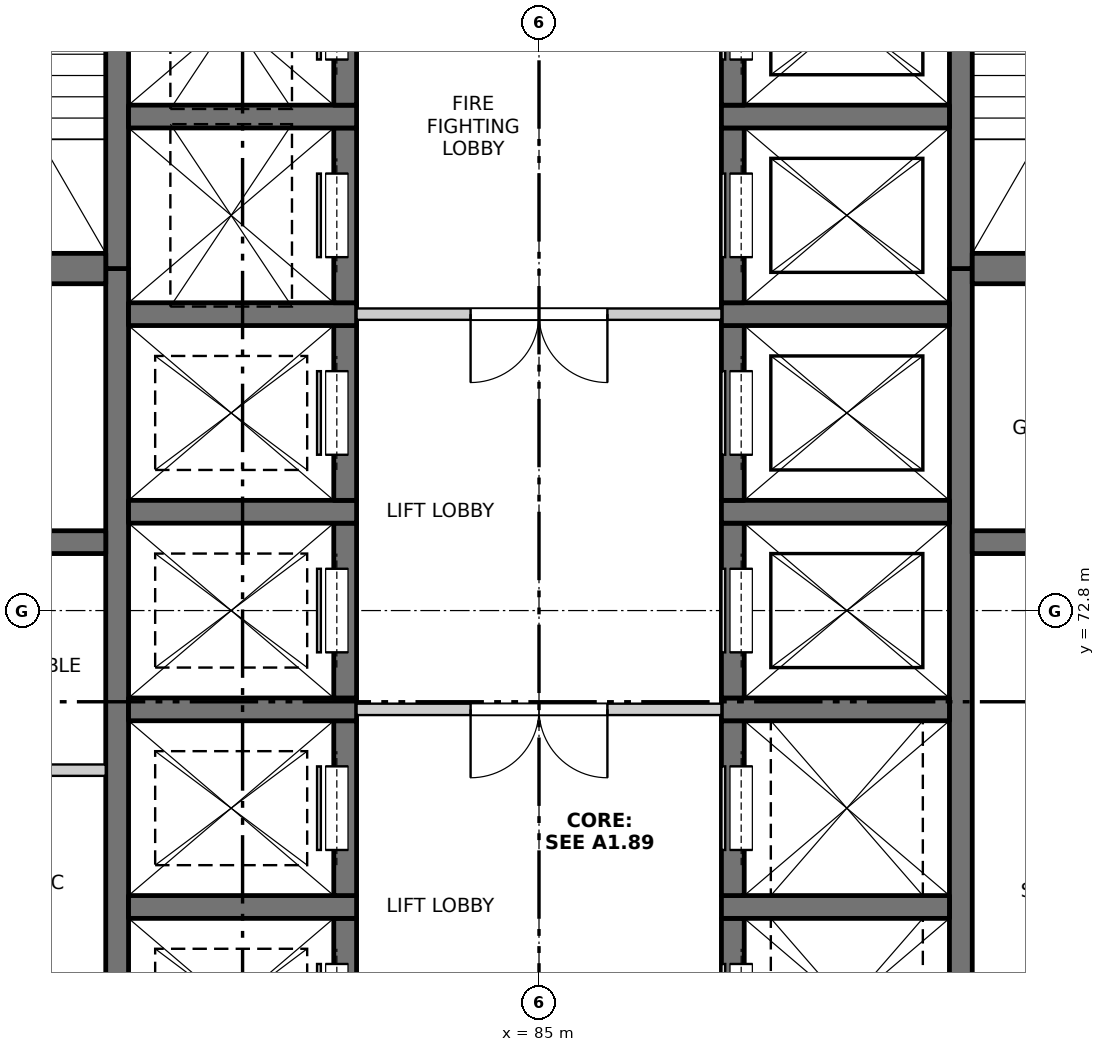
"""IFC4 building model, lengths in metres.
Left out: names, types, materials, properties, quantities, classifications, styles, units other than length and angle.
Written with IfcOpenShell. Run it as: python <this file> out.ifc"""

import sys

from ifc_helpers import new_model, si_unit, direction, frame, frame_2d, origin, place, context, subcontext, project, spatial, rectangle, extrude, element, fill, save


model = new_model("IFC4")
c1 = context("Model", 3, precision=1e-05, world=origin(), true_north=direction((0.0, 1.0)))
c2 = subcontext(c1, "Body", "Model", "MODEL_VIEW")
j1 = project(units=[si_unit("LENGTHUNIT", "METRE"), si_unit("PLANEANGLEUNIT", "RADIAN")], contexts=[c1])
p1 = place(None, origin())
s1 = spatial("IfcSite", under=j1, at=p1, CompositionType="ELEMENT")
p2 = place(p1, origin())
s2 = spatial("IfcBuilding", under=s1, at=p2, CompositionType="ELEMENT")
p3 = place(p2, frame((0.0, 0.0, 133.9)))
s3 = spatial("IfcBuildingStorey", under=s2, at=p3, CompositionType="ELEMENT", Elevation=133.9)
p4 = place(p3, frame((79.45, 60.95, -0.25), z_axis=(0.0, 0.0, 1.0), x_axis=(0.0, 1.0, 0.0)))
e1 = element("IfcWall", 1, at=p4, inside=s3, PredefinedType="SOLIDWALL", context=c2, shape_type="SweptSolid", body=[
    extrude(rectangle(XDim=16.35, YDim=0.3, at=frame_2d((8.175, 0.0))), origin(), (0.0, 0.0, 1.0), 3.4),
])
p5 = place(p3, frame((79.45, 77.3, -0.25), z_axis=(0.0, 0.0, 1.0), x_axis=(0.0, 1.0, 0.0)))
e2 = element("IfcWall", 2, at=p5, inside=s3, PredefinedType="SOLIDWALL", context=c2, shape_type="SweptSolid", body=[
    extrude(rectangle(XDim=6.925, YDim=0.3, at=frame_2d((3.462, 0.0))), origin(), (0.0, 0.0, 1.0), 3.4),
])
p6 = place(p3, frame((90.55, 61.95, -0.25), z_axis=(0.0, 0.0, 1.0), x_axis=(0.0, 1.0, 0.0)))
e3 = element("IfcWall", 3, at=p6, inside=s3, PredefinedType="SOLIDWALL", context=c2, shape_type="SweptSolid", body=[
    extrude(rectangle(XDim=15.35, YDim=0.3, at=frame_2d((7.675, 0.0))), origin(), (0.0, 0.0, 1.0), 3.4),
])
p7 = place(p3, frame((90.55, 77.3, -0.25), z_axis=(0.0, 0.0, 1.0), x_axis=(0.0, 1.0, 0.0)))
e4 = element("IfcWall", 4, at=p7, inside=s3, PredefinedType="SOLIDWALL", context=c2, shape_type="SweptSolid", body=[
    extrude(rectangle(XDim=6.925, YDim=0.3, at=frame_2d((3.462, 0.0))), origin(), (0.0, 0.0, 1.0), 3.4),
])
p8 = place(p3, frame((82.45, 66.45, -0.25), z_axis=(0.0, 0.0, 1.0), x_axis=(0.0, 1.0, 0.0)))
e5 = element("IfcWall", 5, at=p8, inside=s3, PredefinedType="SOLIDWALL", context=c2, shape_type="SweptSolid", body=[
    extrude(rectangle(XDim=2.3, YDim=0.3, at=frame_2d((1.15, 0.0))), origin(), (0.0, 0.0, 1.0), 3.4),
])
p9 = place(p8, frame((0.6, 0.0, 0.25)))
e6 = element("IfcOpeningElement", 6, at=p9, cuts=e5, PredefinedType="OPENING", context=c2, shape_type="SweptSolid", body=[
    extrude(rectangle(XDim=1.1, YDim=2.1, at=frame_2d((0.55, 1.05))), frame((0.0, 0.16, 0.0), z_axis=(0.0, -1.0, 0.0), x_axis=(1.0, 0.0, 0.0)), (0.0, 0.0, 1.0), 0.32),
])
p10 = place(p3, frame((79.6, 68.9, -0.25), z_axis=(0.0, 0.0, 1.0), x_axis=(1.0, 0.0, 0.0)))
e7 = element("IfcWall", 7, at=p10, inside=s3, PredefinedType="SOLIDWALL", context=c2, shape_type="SweptSolid", body=[
    extrude(rectangle(XDim=3.0, YDim=0.3, at=frame_2d((1.5, 0.0))), origin(), (0.0, 0.0, 1.0), 3.4),
])
p11 = place(p3, frame((82.45, 69.05, -0.25), z_axis=(0.0, 0.0, 1.0), x_axis=(0.0, 1.0, 0.0)))
e8 = element("IfcWall", 8, at=p11, inside=s3, PredefinedType="SOLIDWALL", context=c2, shape_type="SweptSolid", body=[
    extrude(rectangle(XDim=2.3, YDim=0.3, at=frame_2d((1.15, 0.0))), origin(), (0.0, 0.0, 1.0), 3.4),
])
p12 = place(p11, frame((0.6, 0.0, 0.25)))
e9 = element("IfcOpeningElement", 9, at=p12, cuts=e8, PredefinedType="OPENING", context=c2, shape_type="SweptSolid", body=[
    extrude(rectangle(XDim=1.1, YDim=2.1, at=frame_2d((0.55, 1.05))), frame((0.0, 0.16, 0.0), z_axis=(0.0, -1.0, 0.0), x_axis=(1.0, 0.0, 0.0)), (0.0, 0.0, 1.0), 0.32),
])
p13 = place(p3, frame((79.6, 71.5, -0.25), z_axis=(0.0, 0.0, 1.0), x_axis=(1.0, 0.0, 0.0)))
e10 = element("IfcWall", 10, at=p13, inside=s3, PredefinedType="SOLIDWALL", context=c2, shape_type="SweptSolid", body=[
    extrude(rectangle(XDim=3.0, YDim=0.3, at=frame_2d((1.5, 0.0))), origin(), (0.0, 0.0, 1.0), 3.4),
])
p14 = place(p3, frame((82.45, 71.65, -0.25), z_axis=(0.0, 0.0, 1.0), x_axis=(0.0, 1.0, 0.0)))
e11 = element("IfcWall", 11, at=p14, inside=s3, PredefinedType="SOLIDWALL", context=c2, shape_type="SweptSolid", body=[
    extrude(rectangle(XDim=2.3, YDim=0.3, at=frame_2d((1.15, 0.0))), origin(), (0.0, 0.0, 1.0), 3.4),
])
p15 = place(p14, frame((0.6, 0.0, 0.25)))
e12 = element("IfcOpeningElement", 12, at=p15, cuts=e11, PredefinedType="OPENING", context=c2, shape_type="SweptSolid", body=[
    extrude(rectangle(XDim=1.1, YDim=2.1, at=frame_2d((0.55, 1.05))), frame((0.0, 0.16, 0.0), z_axis=(0.0, -1.0, 0.0), x_axis=(1.0, 0.0, 0.0)), (0.0, 0.0, 1.0), 0.32),
])
p16 = place(p3, frame((79.6, 74.1, -0.25), z_axis=(0.0, 0.0, 1.0), x_axis=(1.0, 0.0, 0.0)))
e13 = element("IfcWall", 13, at=p16, inside=s3, PredefinedType="SOLIDWALL", context=c2, shape_type="SweptSolid", body=[
    extrude(rectangle(XDim=3.0, YDim=0.3, at=frame_2d((1.5, 0.0))), origin(), (0.0, 0.0, 1.0), 3.4),
])
p17 = place(p3, frame((82.45, 74.25, -0.25), z_axis=(0.0, 0.0, 1.0), x_axis=(0.0, 1.0, 0.0)))
e14 = element("IfcWall", 14, at=p17, inside=s3, PredefinedType="SOLIDWALL", context=c2, shape_type="SweptSolid", body=[
    extrude(rectangle(XDim=2.3, YDim=0.3, at=frame_2d((1.15, 0.0))), origin(), (0.0, 0.0, 1.0), 3.4),
])
p18 = place(p17, frame((0.6, 0.0, 0.25)))
e15 = element("IfcOpeningElement", 15, at=p18, cuts=e14, PredefinedType="OPENING", context=c2, shape_type="SweptSolid", body=[
    extrude(rectangle(XDim=1.1, YDim=2.1, at=frame_2d((0.55, 1.05))), frame((0.0, 0.16, 0.0), z_axis=(0.0, -1.0, 0.0), x_axis=(1.0, 0.0, 0.0)), (0.0, 0.0, 1.0), 0.32),
])
p19 = place(p3, frame((79.6, 76.7, -0.25), z_axis=(0.0, 0.0, 1.0), x_axis=(1.0, 0.0, 0.0)))
e16 = element("IfcWall", 16, at=p19, inside=s3, PredefinedType="SOLIDWALL", context=c2, shape_type="SweptSolid", body=[
    extrude(rectangle(XDim=3.0, YDim=0.3, at=frame_2d((1.5, 0.0))), origin(), (0.0, 0.0, 1.0), 3.4),
])
p20 = place(p3, frame((82.45, 76.85, -0.25), z_axis=(0.0, 0.0, 1.0), x_axis=(0.0, 1.0, 0.0)))
e17 = element("IfcWall", 17, at=p20, inside=s3, PredefinedType="SOLIDWALL", context=c2, shape_type="SweptSolid", body=[
    extrude(rectangle(XDim=2.3, YDim=0.3, at=frame_2d((1.15, 0.0))), origin(), (0.0, 0.0, 1.0), 3.4),
])
p21 = place(p20, frame((0.6, 0.0, 0.25)))
e18 = element("IfcOpeningElement", 18, at=p21, cuts=e17, PredefinedType="OPENING", context=c2, shape_type="SweptSolid", body=[
    extrude(rectangle(XDim=1.1, YDim=2.1, at=frame_2d((0.55, 1.05))), frame((0.0, 0.16, 0.0), z_axis=(0.0, -1.0, 0.0), x_axis=(1.0, 0.0, 0.0)), (0.0, 0.0, 1.0), 0.32),
])
p22 = place(p3, frame((79.6, 79.3, -0.25), z_axis=(0.0, 0.0, 1.0), x_axis=(1.0, 0.0, 0.0)))
e19 = element("IfcWall", 19, at=p22, inside=s3, PredefinedType="SOLIDWALL", context=c2, shape_type="SweptSolid", body=[
    extrude(rectangle(XDim=3.0, YDim=0.3, at=frame_2d((1.5, 0.0))), origin(), (0.0, 0.0, 1.0), 3.4),
])
p23 = place(p3, frame((82.45, 79.45, -0.25), z_axis=(0.0, 0.0, 1.0), x_axis=(0.0, 1.0, 0.0)))
e20 = element("IfcWall", 20, at=p23, inside=s3, PredefinedType="SOLIDWALL", context=c2, shape_type="SweptSolid", body=[
    extrude(rectangle(XDim=2.3, YDim=0.3, at=frame_2d((1.15, 0.0))), origin(), (0.0, 0.0, 1.0), 3.4),
])
p24 = place(p23, frame((0.6, 0.0, 0.25)))
e21 = element("IfcOpeningElement", 21, at=p24, cuts=e20, PredefinedType="OPENING", context=c2, shape_type="SweptSolid", body=[
    extrude(rectangle(XDim=1.1, YDim=2.1, at=frame_2d((0.55, 1.05))), frame((0.0, 0.16, 0.0), z_axis=(0.0, -1.0, 0.0), x_axis=(1.0, 0.0, 0.0)), (0.0, 0.0, 1.0), 0.32),
])
p25 = place(p3, frame((87.55, 66.45, -0.25), z_axis=(0.0, 0.0, 1.0), x_axis=(0.0, 1.0, 0.0)))
e22 = element("IfcWall", 22, at=p25, inside=s3, PredefinedType="SOLIDWALL", context=c2, shape_type="SweptSolid", body=[
    extrude(rectangle(XDim=2.3, YDim=0.3, at=frame_2d((1.15, 0.0))), origin(), (0.0, 0.0, 1.0), 3.4),
])
p26 = place(p25, frame((0.6, 0.0, 0.25)))
e23 = element("IfcOpeningElement", 23, at=p26, cuts=e22, PredefinedType="OPENING", context=c2, shape_type="SweptSolid", body=[
    extrude(rectangle(XDim=1.1, YDim=2.1, at=frame_2d((0.55, 1.05))), frame((0.0, 0.16, 0.0), z_axis=(0.0, -1.0, 0.0), x_axis=(1.0, 0.0, 0.0)), (0.0, 0.0, 1.0), 0.32),
])
p27 = place(p3, frame((87.4, 68.9, -0.25), z_axis=(0.0, 0.0, 1.0), x_axis=(1.0, 0.0, 0.0)))
e24 = element("IfcWall", 24, at=p27, inside=s3, PredefinedType="SOLIDWALL", context=c2, shape_type="SweptSolid", body=[
    extrude(rectangle(XDim=3.0, YDim=0.3, at=frame_2d((1.5, 0.0))), origin(), (0.0, 0.0, 1.0), 3.4),
])
p28 = place(p3, frame((87.55, 69.05, -0.25), z_axis=(0.0, 0.0, 1.0), x_axis=(0.0, 1.0, 0.0)))
e25 = element("IfcWall", 25, at=p28, inside=s3, PredefinedType="SOLIDWALL", context=c2, shape_type="SweptSolid", body=[
    extrude(rectangle(XDim=2.3, YDim=0.3, at=frame_2d((1.15, 0.0))), origin(), (0.0, 0.0, 1.0), 3.4),
])
p29 = place(p28, frame((0.6, 0.0, 0.25)))
e26 = element("IfcOpeningElement", 26, at=p29, cuts=e25, PredefinedType="OPENING", context=c2, shape_type="SweptSolid", body=[
    extrude(rectangle(XDim=1.1, YDim=2.1, at=frame_2d((0.55, 1.05))), frame((0.0, 0.16, 0.0), z_axis=(0.0, -1.0, 0.0), x_axis=(1.0, 0.0, 0.0)), (0.0, 0.0, 1.0), 0.32),
])
p30 = place(p3, frame((87.4, 71.5, -0.25), z_axis=(0.0, 0.0, 1.0), x_axis=(1.0, 0.0, 0.0)))
e27 = element("IfcWall", 27, at=p30, inside=s3, PredefinedType="SOLIDWALL", context=c2, shape_type="SweptSolid", body=[
    extrude(rectangle(XDim=3.0, YDim=0.3, at=frame_2d((1.5, 0.0))), origin(), (0.0, 0.0, 1.0), 3.4),
])
p31 = place(p3, frame((87.55, 71.65, -0.25), z_axis=(0.0, 0.0, 1.0), x_axis=(0.0, 1.0, 0.0)))
e28 = element("IfcWall", 28, at=p31, inside=s3, PredefinedType="SOLIDWALL", context=c2, shape_type="SweptSolid", body=[
    extrude(rectangle(XDim=2.3, YDim=0.3, at=frame_2d((1.15, 0.0))), origin(), (0.0, 0.0, 1.0), 3.4),
])
p32 = place(p31, frame((0.6, 0.0, 0.25)))
e29 = element("IfcOpeningElement", 29, at=p32, cuts=e28, PredefinedType="OPENING", context=c2, shape_type="SweptSolid", body=[
    extrude(rectangle(XDim=1.1, YDim=2.1, at=frame_2d((0.55, 1.05))), frame((0.0, 0.16, 0.0), z_axis=(0.0, -1.0, 0.0), x_axis=(1.0, 0.0, 0.0)), (0.0, 0.0, 1.0), 0.32),
])
p33 = place(p3, frame((87.4, 74.1, -0.25), z_axis=(0.0, 0.0, 1.0), x_axis=(1.0, 0.0, 0.0)))
e30 = element("IfcWall", 30, at=p33, inside=s3, PredefinedType="SOLIDWALL", context=c2, shape_type="SweptSolid", body=[
    extrude(rectangle(XDim=3.0, YDim=0.3, at=frame_2d((1.5, 0.0))), origin(), (0.0, 0.0, 1.0), 3.4),
])
p34 = place(p3, frame((87.55, 74.25, -0.25), z_axis=(0.0, 0.0, 1.0), x_axis=(0.0, 1.0, 0.0)))
e31 = element("IfcWall", 31, at=p34, inside=s3, PredefinedType="SOLIDWALL", context=c2, shape_type="SweptSolid", body=[
    extrude(rectangle(XDim=2.3, YDim=0.3, at=frame_2d((1.15, 0.0))), origin(), (0.0, 0.0, 1.0), 3.4),
])
p35 = place(p34, frame((0.6, 0.0, 0.25)))
e32 = element("IfcOpeningElement", 32, at=p35, cuts=e31, PredefinedType="OPENING", context=c2, shape_type="SweptSolid", body=[
    extrude(rectangle(XDim=1.1, YDim=2.1, at=frame_2d((0.55, 1.05))), frame((0.0, 0.16, 0.0), z_axis=(0.0, -1.0, 0.0), x_axis=(1.0, 0.0, 0.0)), (0.0, 0.0, 1.0), 0.32),
])
p36 = place(p3, frame((87.4, 76.7, -0.25), z_axis=(0.0, 0.0, 1.0), x_axis=(1.0, 0.0, 0.0)))
e33 = element("IfcWall", 33, at=p36, inside=s3, PredefinedType="SOLIDWALL", context=c2, shape_type="SweptSolid", body=[
    extrude(rectangle(XDim=3.0, YDim=0.3, at=frame_2d((1.5, 0.0))), origin(), (0.0, 0.0, 1.0), 3.4),
])
p37 = place(p3, frame((87.55, 76.85, -0.25), z_axis=(0.0, 0.0, 1.0), x_axis=(0.0, 1.0, 0.0)))
e34 = element("IfcWall", 34, at=p37, inside=s3, PredefinedType="SOLIDWALL", context=c2, shape_type="SweptSolid", body=[
    extrude(rectangle(XDim=2.3, YDim=0.3, at=frame_2d((1.15, 0.0))), origin(), (0.0, 0.0, 1.0), 3.4),
])
p38 = place(p37, frame((0.6, 0.0, 0.25)))
e35 = element("IfcOpeningElement", 35, at=p38, cuts=e34, PredefinedType="OPENING", context=c2, shape_type="SweptSolid", body=[
    extrude(rectangle(XDim=1.1, YDim=2.1, at=frame_2d((0.55, 1.05))), frame((0.0, 0.16, 0.0), z_axis=(0.0, -1.0, 0.0), x_axis=(1.0, 0.0, 0.0)), (0.0, 0.0, 1.0), 0.32),
])
p39 = place(p3, frame((87.4, 79.3, -0.25), z_axis=(0.0, 0.0, 1.0), x_axis=(1.0, 0.0, 0.0)))
e36 = element("IfcWall", 36, at=p39, inside=s3, PredefinedType="SOLIDWALL", context=c2, shape_type="SweptSolid", body=[
    extrude(rectangle(XDim=3.0, YDim=0.3, at=frame_2d((1.5, 0.0))), origin(), (0.0, 0.0, 1.0), 3.4),
])
p40 = place(p3, frame((87.55, 79.45, -0.25), z_axis=(0.0, 0.0, 1.0), x_axis=(0.0, 1.0, 0.0)))
e37 = element("IfcWall", 37, at=p40, inside=s3, PredefinedType="SOLIDWALL", context=c2, shape_type="SweptSolid", body=[
    extrude(rectangle(XDim=2.3, YDim=0.3, at=frame_2d((1.15, 0.0))), origin(), (0.0, 0.0, 1.0), 3.4),
])
p41 = place(p40, frame((0.6, 0.0, 0.25)))
e38 = element("IfcOpeningElement", 38, at=p41, cuts=e37, PredefinedType="OPENING", context=c2, shape_type="SweptSolid", body=[
    extrude(rectangle(XDim=1.1, YDim=2.1, at=frame_2d((0.55, 1.05))), frame((0.0, 0.16, 0.0), z_axis=(0.0, -1.0, 0.0), x_axis=(1.0, 0.0, 0.0)), (0.0, 0.0, 1.0), 0.32),
])
p42 = place(p3, frame((75.525, 73.7, -0.25), z_axis=(0.0, 0.0, 1.0), x_axis=(1.0, 0.0, 0.0)))
e39 = element("IfcWall", 39, at=p42, inside=s3, PredefinedType="SOLIDWALL", context=c2, shape_type="SweptSolid", body=[
    extrude(rectangle(XDim=3.775, YDim=0.3, at=frame_2d((1.888, 0.0))), origin(), (0.0, 0.0, 1.0), 3.4),
])
p43 = place(p3, frame((75.525, 77.3, -0.25), z_axis=(0.0, 0.0, 1.0), x_axis=(1.0, 0.0, 0.0)))
e40 = element("IfcWall", 40, at=p43, inside=s3, PredefinedType="SOLIDWALL", context=c2, shape_type="SweptSolid", body=[
    extrude(rectangle(XDim=3.775, YDim=0.4, at=frame_2d((1.888, 0.0))), origin(), (0.0, 0.0, 1.0), 3.4),
])
p44 = place(p3, frame((90.7, 73.7, -0.25), z_axis=(0.0, 0.0, 1.0), x_axis=(1.0, 0.0, 0.0)))
e41 = element("IfcWall", 41, at=p44, inside=s3, PredefinedType="SOLIDWALL", context=c2, shape_type="SweptSolid", body=[
    extrude(rectangle(XDim=3.775, YDim=0.3, at=frame_2d((1.888, 0.0))), origin(), (0.0, 0.0, 1.0), 3.4),
])
p45 = place(p3, frame((90.7, 77.3, -0.25), z_axis=(0.0, 0.0, 1.0), x_axis=(1.0, 0.0, 0.0)))
e42 = element("IfcWall", 42, at=p45, inside=s3, PredefinedType="SOLIDWALL", context=c2, shape_type="SweptSolid", body=[
    extrude(rectangle(XDim=3.775, YDim=0.4, at=frame_2d((1.888, 0.0))), origin(), (0.0, 0.0, 1.0), 3.4),
])
p46 = place(p3, frame((75.525, 70.7, 0.0), z_axis=(0.0, 0.0, 1.0), x_axis=(1.0, 0.0, 0.0)))
e43 = element("IfcWall", 43, at=p46, inside=s3, PredefinedType="PARTITIONING", context=c2, shape_type="SweptSolid", body=[
    extrude(rectangle(XDim=3.775, YDim=0.15, at=frame_2d((1.887, 0.0))), origin(), (0.0, 0.0, 1.0), 3.15),
])
p47 = place(p3, frame((82.6, 71.5, 0.0), z_axis=(0.0, 0.0, 1.0), x_axis=(1.0, 0.0, 0.0)))
e44 = element("IfcWall", 44, at=p47, inside=s3, PredefinedType="PARTITIONING", context=c2, shape_type="SweptSolid", body=[
    extrude(rectangle(XDim=4.8, YDim=0.15, at=frame_2d((2.4, 0.0))), origin(), (0.0, 0.0, 1.0), 3.15),
])
p48 = place(p47, frame((1.5, 0.0, 0.0)))
e45 = element("IfcOpeningElement", 45, at=p48, cuts=e44, PredefinedType="OPENING", context=c2, shape_type="SweptSolid", body=[
    extrude(rectangle(XDim=1.8, YDim=2.1, at=frame_2d((0.9, 1.05))), frame((0.0, 0.085, 0.0), z_axis=(0.0, -1.0, 0.0), x_axis=(1.0, 0.0, 0.0)), (0.0, 0.0, 1.0), 0.17),
])
p49 = place(p3, frame((82.6, 76.7, 0.0), z_axis=(0.0, 0.0, 1.0), x_axis=(1.0, 0.0, 0.0)))
e46 = element("IfcWall", 46, at=p49, inside=s3, PredefinedType="PARTITIONING", context=c2, shape_type="SweptSolid", body=[
    extrude(rectangle(XDim=4.8, YDim=0.15, at=frame_2d((2.4, 0.0))), origin(), (0.0, 0.0, 1.0), 3.15),
])
p50 = place(p49, frame((1.5, 0.0, 0.0)))
e47 = element("IfcOpeningElement", 47, at=p50, cuts=e46, PredefinedType="OPENING", context=c2, shape_type="SweptSolid", body=[
    extrude(rectangle(XDim=1.8, YDim=2.1, at=frame_2d((0.9, 1.05))), frame((0.0, 0.085, 0.0), z_axis=(0.0, -1.0, 0.0), x_axis=(1.0, 0.0, 0.0)), (0.0, 0.0, 1.0), 0.17),
])
p51 = place(p9, origin())
e48 = element("IfcDoor", 48, at=p51, inside=s3, OperationType="SLIDING_TO_RIGHT", PredefinedType="DOOR", context=c2, shape_type="SweptSolid", body=[
    extrude(rectangle(XDim=1.1, YDim=2.1, at=frame_2d((0.55, 1.05))), frame((0.0, 0.135, 0.0), z_axis=(0.0, -1.0, 0.0), x_axis=(1.0, 0.0, 0.0)), (0.0, 0.0, 1.0), 0.05),
])
fill(e6, e48)
p52 = place(p26, origin())
e49 = element("IfcDoor", 49, at=p52, inside=s3, OperationType="SLIDING_TO_RIGHT", PredefinedType="DOOR", context=c2, shape_type="SweptSolid", body=[
    extrude(rectangle(XDim=1.1, YDim=2.1, at=frame_2d((0.55, 1.05))), frame((0.0, -0.085, 0.0), z_axis=(0.0, -1.0, 0.0), x_axis=(1.0, 0.0, 0.0)), (0.0, 0.0, 1.0), 0.05),
])
fill(e23, e49)
p53 = place(p12, origin())
e50 = element("IfcDoor", 50, at=p53, inside=s3, OperationType="SLIDING_TO_LEFT", PredefinedType="DOOR", context=c2, shape_type="SweptSolid", body=[
    extrude(rectangle(XDim=1.1, YDim=2.1, at=frame_2d((0.55, 1.05))), frame((0.0, 0.135, 0.0), z_axis=(0.0, -1.0, 0.0), x_axis=(1.0, 0.0, 0.0)), (0.0, 0.0, 1.0), 0.05),
])
fill(e9, e50)
p54 = place(p29, origin())
e51 = element("IfcDoor", 51, at=p54, inside=s3, OperationType="SLIDING_TO_LEFT", PredefinedType="DOOR", context=c2, shape_type="SweptSolid", body=[
    extrude(rectangle(XDim=1.1, YDim=2.1, at=frame_2d((0.55, 1.05))), frame((0.0, -0.085, 0.0), z_axis=(0.0, -1.0, 0.0), x_axis=(1.0, 0.0, 0.0)), (0.0, 0.0, 1.0), 0.05),
])
fill(e26, e51)
p55 = place(p48, origin())
e52 = element("IfcDoor", 52, at=p55, inside=s3, OperationType="DOUBLE_DOOR_SINGLE_SWING", PredefinedType="DOOR", context=c2, shape_type="SweptSolid", body=[
    extrude(rectangle(XDim=1.8, YDim=2.1, at=frame_2d((0.9, 1.05))), frame((0.0, 0.025, 0.0), z_axis=(0.0, -1.0, 0.0), x_axis=(1.0, 0.0, 0.0)), (0.0, 0.0, 1.0), 0.05),
])
fill(e45, e52)
p56 = place(p15, origin())
e53 = element("IfcDoor", 53, at=p56, inside=s3, OperationType="SLIDING_TO_LEFT", PredefinedType="DOOR", context=c2, shape_type="SweptSolid", body=[
    extrude(rectangle(XDim=1.1, YDim=2.1, at=frame_2d((0.55, 1.05))), frame((0.0, 0.135, 0.0), z_axis=(0.0, -1.0, 0.0), x_axis=(1.0, 0.0, 0.0)), (0.0, 0.0, 1.0), 0.05),
])
fill(e12, e53)
p57 = place(p32, origin())
e54 = element("IfcDoor", 54, at=p57, inside=s3, OperationType="SLIDING_TO_LEFT", PredefinedType="DOOR", context=c2, shape_type="SweptSolid", body=[
    extrude(rectangle(XDim=1.1, YDim=2.1, at=frame_2d((0.55, 1.05))), frame((0.0, -0.085, 0.0), z_axis=(0.0, -1.0, 0.0), x_axis=(1.0, 0.0, 0.0)), (0.0, 0.0, 1.0), 0.05),
])
fill(e29, e54)
p58 = place(p18, origin())
e55 = element("IfcDoor", 55, at=p58, inside=s3, OperationType="SLIDING_TO_LEFT", PredefinedType="DOOR", context=c2, shape_type="SweptSolid", body=[
    extrude(rectangle(XDim=1.1, YDim=2.1, at=frame_2d((0.55, 1.05))), frame((0.0, 0.135, 0.0), z_axis=(0.0, -1.0, 0.0), x_axis=(1.0, 0.0, 0.0)), (0.0, 0.0, 1.0), 0.05),
])
fill(e15, e55)
p59 = place(p35, origin())
e56 = element("IfcDoor", 56, at=p59, inside=s3, OperationType="SLIDING_TO_LEFT", PredefinedType="DOOR", context=c2, shape_type="SweptSolid", body=[
    extrude(rectangle(XDim=1.1, YDim=2.1, at=frame_2d((0.55, 1.05))), frame((0.0, -0.085, 0.0), z_axis=(0.0, -1.0, 0.0), x_axis=(1.0, 0.0, 0.0)), (0.0, 0.0, 1.0), 0.05),
])
fill(e32, e56)
p60 = place(p50, origin())
e57 = element("IfcDoor", 57, at=p60, inside=s3, OperationType="DOUBLE_DOOR_SINGLE_SWING", PredefinedType="DOOR", context=c2, shape_type="SweptSolid", body=[
    extrude(rectangle(XDim=1.8, YDim=2.1, at=frame_2d((0.9, 1.05))), frame((0.0, 0.025, 0.0), z_axis=(0.0, -1.0, 0.0), x_axis=(1.0, 0.0, 0.0)), (0.0, 0.0, 1.0), 0.05),
])
fill(e47, e57)
p61 = place(p21, origin())
e58 = element("IfcDoor", 58, at=p61, inside=s3, OperationType="SLIDING_TO_LEFT", PredefinedType="DOOR", context=c2, shape_type="SweptSolid", body=[
    extrude(rectangle(XDim=1.1, YDim=2.1, at=frame_2d((0.55, 1.05))), frame((0.0, 0.135, 0.0), z_axis=(0.0, -1.0, 0.0), x_axis=(1.0, 0.0, 0.0)), (0.0, 0.0, 1.0), 0.05),
])
fill(e18, e58)
p62 = place(p38, origin())
e59 = element("IfcDoor", 59, at=p62, inside=s3, OperationType="SLIDING_TO_LEFT", PredefinedType="DOOR", context=c2, shape_type="SweptSolid", body=[
    extrude(rectangle(XDim=1.1, YDim=2.1, at=frame_2d((0.55, 1.05))), frame((0.0, -0.085, 0.0), z_axis=(0.0, -1.0, 0.0), x_axis=(1.0, 0.0, 0.0)), (0.0, 0.0, 1.0), 0.05),
])
fill(e35, e59)
p63 = place(p24, origin())
e60 = element("IfcDoor", 60, at=p63, inside=s3, OperationType="SLIDING_TO_LEFT", PredefinedType="DOOR", context=c2, shape_type="SweptSolid", body=[
    extrude(rectangle(XDim=1.1, YDim=2.1, at=frame_2d((0.55, 1.05))), frame((0.0, 0.135, 0.0), z_axis=(0.0, -1.0, 0.0), x_axis=(1.0, 0.0, 0.0)), (0.0, 0.0, 1.0), 0.05),
])
fill(e21, e60)
p64 = place(p41, origin())
e61 = element("IfcDoor", 61, at=p64, inside=s3, OperationType="SLIDING_TO_RIGHT", PredefinedType="DOOR", context=c2, shape_type="SweptSolid", body=[
    extrude(rectangle(XDim=1.1, YDim=2.1, at=frame_2d((0.55, 1.05))), frame((0.0, -0.085, 0.0), z_axis=(0.0, -1.0, 0.0), x_axis=(1.0, 0.0, 0.0)), (0.0, 0.0, 1.0), 0.05),
])
fill(e38, e61)
save(model, sys.argv[1])
